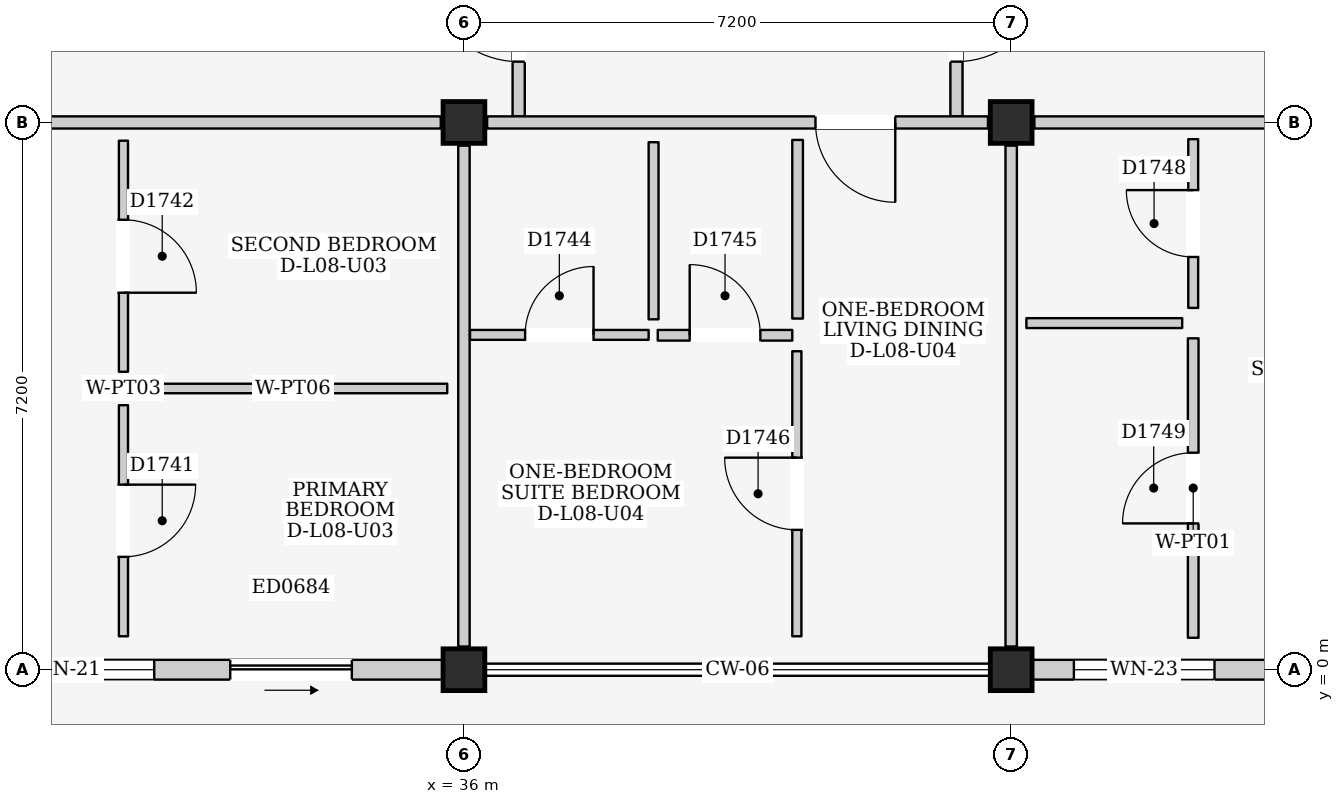
"""IFC4 building model, lengths in metres.
Left out: names, types, materials, properties, quantities, classifications, styles, units other than length and angle.
Written with IfcOpenShell. Run it as: python <this file> out.ifc"""

import sys

from ifc_helpers import new_model, si_unit, direction, frame, frame_2d, origin, origin_2d, place, context, subcontext, project, spatial, rectangle, extrude, element, fill, save


model = new_model("IFC4")
c1 = context("Model", 3, precision=1e-05, world=origin(), true_north=direction((0.0, 1.0)))
c2 = subcontext(c1, "Body", "Model", "MODEL_VIEW")
j1 = project(units=[si_unit("LENGTHUNIT", "METRE"), si_unit("PLANEANGLEUNIT", "RADIAN")], contexts=[c1])
p1 = place(None, origin())
s1 = spatial("IfcSite", under=j1, at=p1, CompositionType="ELEMENT")
p2 = place(p1, origin())
s2 = spatial("IfcBuilding", under=s1, at=p2, CompositionType="ELEMENT")
p3 = place(p2, frame((0.0, 0.0, 28.3)))
s3 = spatial("IfcBuildingStorey", under=s2, at=p3, CompositionType="ELEMENT", Elevation=28.3)
for number, where, z_axis, x_axis in (
    (1, (36.0, 0.0, 0.0), (0.0, 0.0, 1.0), (1.0, 0.0, 0.0)),
    (2, (36.0, 7.2, 0.0), (0.0, 0.0, 1.0), (1.0, 0.0, 0.0)),
    (3, (43.2, 0.0, 0.0), (0.0, 0.0, 1.0), (1.0, 0.0, 0.0)),
    (4, (43.2, 7.2, 0.0), (0.0, 0.0, 1.0), (1.0, 0.0, 0.0)),
):
    element("IfcColumn", number, at=place(p3, frame(where, z_axis=z_axis, x_axis=x_axis)), inside=s3, PredefinedType="COLUMN", context=c2, shape_type="SweptSolid", body=[
        extrude(rectangle(XDim=0.55, YDim=0.55, at=origin_2d()), origin(), (0.0, 0.0, 1.0), 3.2),
    ])
p4 = place(p3, frame((29.075, 0.0, 0.0), z_axis=(0.0, 0.0, 1.0), x_axis=(1.0, 0.0, 0.0)))
e5 = element("IfcWall", 5, at=p4, inside=s3, PredefinedType="ELEMENTEDWALL", context=c2, shape_type="SweptSolid", body=[
    extrude(rectangle(XDim=6.65, YDim=0.26, at=frame_2d((3.325, 0.0))), origin(), (0.0, 0.0, 1.0), 2.495),
])
p5 = place(p4, frame((3.85, 0.0, 0.0)))
e6 = element("IfcOpeningElement", 6, at=p5, cuts=e5, PredefinedType="OPENING", context=c2, shape_type="SweptSolid", body=[
    extrude(rectangle(XDim=1.6, YDim=2.12, at=frame_2d((0.8, 1.06))), frame((0.0, 0.145, 0.0), z_axis=(0.0, -1.0, 0.0), x_axis=(1.0, 0.0, 0.0)), (0.0, 0.0, 1.0), 0.29),
])
p6 = place(p4, frame((0.55, 0.0, 0.78)))
e7 = element("IfcOpeningElement", 7, at=p6, cuts=e5, PredefinedType="OPENING", context=c2, shape_type="SweptSolid", body=[
    extrude(rectangle(XDim=2.3, YDim=1.6, at=frame_2d((1.15, 0.8))), frame((0.0, 0.145, 0.0), z_axis=(0.0, -1.0, 0.0), x_axis=(1.0, 0.0, 0.0)), (0.0, 0.0, 1.0), 0.29),
])
p7 = place(p3, frame((43.475, 0.0, 0.0), z_axis=(0.0, 0.0, 1.0), x_axis=(1.0, 0.0, 0.0)))
e8 = element("IfcWall", 8, at=p7, inside=s3, PredefinedType="ELEMENTEDWALL", context=c2, shape_type="SweptSolid", body=[
    extrude(rectangle(XDim=6.65, YDim=0.26, at=frame_2d((3.325, 0.0))), origin(), (0.0, 0.0, 1.0), 2.495),
])
p8 = place(p7, frame((3.85, 0.0, 0.0)))
e9 = element("IfcOpeningElement", 9, at=p8, cuts=e8, PredefinedType="OPENING", context=c2, shape_type="SweptSolid", body=[
    extrude(rectangle(XDim=2.4, YDim=2.12, at=frame_2d((1.2, 1.06))), frame((0.0, 0.145, 0.0), z_axis=(0.0, -1.0, 0.0), x_axis=(1.0, 0.0, 0.0)), (0.0, 0.0, 1.0), 0.29),
])
p9 = place(p7, frame((0.55, 0.0, 0.9)))
e10 = element("IfcOpeningElement", 10, at=p9, cuts=e8, PredefinedType="OPENING", context=c2, shape_type="SweptSolid", body=[
    extrude(rectangle(XDim=1.85, YDim=1.4, at=frame_2d((0.925, 0.7))), frame((0.0, 0.145, 0.0), z_axis=(0.0, -1.0, 0.0), x_axis=(1.0, 0.0, 0.0)), (0.0, 0.0, 1.0), 0.29),
])
p10 = place(p3, frame((36.72, 7.28, 0.0), z_axis=(0.0, 0.0, 1.0), x_axis=(0.0, 1.0, 0.0)))
e11 = element("IfcWall", 11, at=p10, inside=s3, PredefinedType="PARTITIONING", context=c2, shape_type="SweptSolid", body=[
    extrude(rectangle(XDim=4.32, YDim=0.16, at=frame_2d((2.16, 0.0))), origin(), (0.0, 0.0, 1.0), 2.95),
])
p11 = place(p10, frame((0.72, 0.0, 0.0)))
e12 = element("IfcOpeningElement", 12, at=p11, cuts=e11, PredefinedType="OPENING", context=c2, shape_type="SweptSolid", body=[
    extrude(rectangle(XDim=1.2, YDim=2.2, at=frame_2d((0.6, 1.1))), frame((0.0, 0.095, 0.0), z_axis=(0.0, -1.0, 0.0), x_axis=(1.0, 0.0, 0.0)), (0.0, 0.0, 1.0), 0.19),
])
p12 = place(p3, frame((42.48, 7.28, 0.0), z_axis=(0.0, 0.0, 1.0), x_axis=(0.0, 1.0, 0.0)))
e13 = element("IfcWall", 13, at=p12, inside=s3, PredefinedType="PARTITIONING", context=c2, shape_type="SweptSolid", body=[
    extrude(rectangle(XDim=4.32, YDim=0.16, at=frame_2d((2.16, 0.0))), origin(), (0.0, 0.0, 1.0), 2.95),
])
p13 = place(p12, frame((0.72, 0.0, 0.0)))
e14 = element("IfcOpeningElement", 14, at=p13, cuts=e13, PredefinedType="OPENING", context=c2, shape_type="SweptSolid", body=[
    extrude(rectangle(XDim=1.2, YDim=2.2, at=frame_2d((0.6, 1.1))), frame((0.0, 0.095, 0.0), z_axis=(0.0, -1.0, 0.0), x_axis=(1.0, 0.0, 0.0)), (0.0, 0.0, 1.0), 0.19),
])
p14 = place(p3, frame((29.105, 7.2, 0.0), z_axis=(0.0, 0.0, 1.0), x_axis=(1.0, 0.0, 0.0)))
e15 = element("IfcWall", 15, at=p14, inside=s3, PredefinedType="PARTITIONING", context=c2, shape_type="SweptSolid", body=[
    extrude(rectangle(XDim=6.59, YDim=0.16, at=frame_2d((3.295, 0.0))), origin(), (0.0, 0.0, 1.0), 2.345),
])
p15 = place(p14, frame((0.18, 0.0, 0.0)))
e16 = element("IfcOpeningElement", 16, at=p15, cuts=e15, PredefinedType="OPENING", context=c2, shape_type="SweptSolid", body=[
    extrude(rectangle(XDim=1.05, YDim=2.15, at=frame_2d((0.525, 1.075))), frame((0.0, 0.095, 0.0), z_axis=(0.0, -1.0, 0.0), x_axis=(1.0, 0.0, 0.0)), (0.0, 0.0, 1.0), 0.19),
])
p16 = place(p3, frame((36.0, 0.305, 0.0), z_axis=(0.0, 0.0, 1.0), x_axis=(0.0, 1.0, 0.0)))
e17 = element("IfcWall", 17, at=p16, inside=s3, PredefinedType="PARTITIONING", context=c2, shape_type="SweptSolid", body=[
    extrude(rectangle(XDim=6.59, YDim=0.15, at=frame_2d((3.295, 0.0))), origin(), (0.0, 0.0, 1.0), 2.445),
])
p17 = place(p3, frame((31.52, 0.44, 0.0), z_axis=(0.0, 0.0, 1.0), x_axis=(0.0, 1.0, 0.0)))
e18 = element("IfcWall", 18, at=p17, inside=s3, PredefinedType="PARTITIONING", context=c2, shape_type="SweptSolid", body=[
    extrude(rectangle(XDim=3.04, YDim=0.12, at=frame_2d((1.52, 0.0))), origin(), (0.0, 0.0, 1.0), 2.95),
])
p18 = place(p17, frame((1.045, 0.0, 0.0)))
e19 = element("IfcOpeningElement", 19, at=p18, cuts=e18, PredefinedType="OPENING", context=c2, shape_type="SweptSolid", body=[
    extrude(rectangle(XDim=0.95, YDim=2.15, at=frame_2d((0.475, 1.075))), frame((0.0, 0.075, 0.0), z_axis=(0.0, -1.0, 0.0), x_axis=(1.0, 0.0, 0.0)), (0.0, 0.0, 1.0), 0.15),
])
p19 = place(p3, frame((31.72, 3.7, 0.0), z_axis=(0.0, 0.0, 1.0), x_axis=(1.0, 0.0, 0.0)))
e20 = element("IfcWall", 20, at=p19, inside=s3, PredefinedType="PARTITIONING", context=c2, shape_type="SweptSolid", body=[
    extrude(rectangle(XDim=4.06, YDim=0.125, at=frame_2d((2.03, 0.0))), origin(), (0.0, 0.0, 1.0), 2.95),
])
p20 = place(p3, frame((31.52, 3.92, 0.0), z_axis=(0.0, 0.0, 1.0), x_axis=(0.0, 1.0, 0.0)))
e21 = element("IfcWall", 21, at=p20, inside=s3, PredefinedType="PARTITIONING", context=c2, shape_type="SweptSolid", body=[
    extrude(rectangle(XDim=3.04, YDim=0.12, at=frame_2d((1.52, 0.0))), origin(), (0.0, 0.0, 1.0), 2.95),
])
p21 = place(p20, frame((1.04, 0.0, 0.0)))
e22 = element("IfcOpeningElement", 22, at=p21, cuts=e21, PredefinedType="OPENING", context=c2, shape_type="SweptSolid", body=[
    extrude(rectangle(XDim=0.96, YDim=2.15, at=frame_2d((0.48, 1.075))), frame((0.0, 0.075, 0.0), z_axis=(0.0, -1.0, 0.0), x_axis=(1.0, 0.0, 0.0)), (0.0, 0.0, 1.0), 0.15),
])
p22 = place(p3, frame((36.305, 7.2, 0.0), z_axis=(0.0, 0.0, 1.0), x_axis=(1.0, 0.0, 0.0)))
e23 = element("IfcWall", 23, at=p22, inside=s3, PredefinedType="PARTITIONING", context=c2, shape_type="SweptSolid", body=[
    extrude(rectangle(XDim=6.59, YDim=0.16, at=frame_2d((3.295, 0.0))), origin(), (0.0, 0.0, 1.0), 2.345),
])
p23 = place(p22, frame((4.32, 0.0, 0.0)))
e24 = element("IfcOpeningElement", 24, at=p23, cuts=e23, PredefinedType="OPENING", context=c2, shape_type="SweptSolid", body=[
    extrude(rectangle(XDim=1.05, YDim=2.15, at=frame_2d((0.525, 1.075))), frame((0.0, 0.095, 0.0), z_axis=(0.0, -1.0, 0.0), x_axis=(1.0, 0.0, 0.0)), (0.0, 0.0, 1.0), 0.19),
])
p24 = place(p3, frame((43.2, 0.305, 0.0), z_axis=(0.0, 0.0, 1.0), x_axis=(0.0, 1.0, 0.0)))
e25 = element("IfcWall", 25, at=p24, inside=s3, PredefinedType="PARTITIONING", context=c2, shape_type="SweptSolid", body=[
    extrude(rectangle(XDim=6.59, YDim=0.15, at=frame_2d((3.295, 0.0))), origin(), (0.0, 0.0, 1.0), 2.445),
])
p25 = place(p3, frame((36.08, 4.405, 0.0), z_axis=(0.0, 0.0, 1.0), x_axis=(1.0, 0.0, 0.0)))
e26 = element("IfcWall", 26, at=p25, inside=s3, PredefinedType="PARTITIONING", context=c2, shape_type="SweptSolid", body=[
    extrude(rectangle(XDim=2.35, YDim=0.13, at=frame_2d((1.175, 0.0))), origin(), (0.0, 0.0, 1.0), 2.95),
])
p26 = place(p25, frame((0.725, 0.0, 0.0)))
e27 = element("IfcOpeningElement", 27, at=p26, cuts=e26, PredefinedType="OPENING", context=c2, shape_type="SweptSolid", body=[
    extrude(rectangle(XDim=0.9, YDim=2.1, at=frame_2d((0.45, 1.05))), frame((0.0, 0.08, 0.0), z_axis=(0.0, -1.0, 0.0), x_axis=(1.0, 0.0, 0.0)), (0.0, 0.0, 1.0), 0.16),
])
p27 = place(p3, frame((38.495, 4.61, 0.0), z_axis=(0.0, 0.0, 1.0), x_axis=(0.0, 1.0, 0.0)))
e28 = element("IfcWall", 28, at=p27, inside=s3, PredefinedType="PARTITIONING", context=c2, shape_type="SweptSolid", body=[
    extrude(rectangle(XDim=2.33, YDim=0.13, at=frame_2d((1.165, 0.0))), origin(), (0.0, 0.0, 1.0), 2.95),
])
p28 = place(p3, frame((38.55, 4.4, 0.0), z_axis=(0.0, 0.0, 1.0), x_axis=(1.0, 0.0, 0.0)))
e29 = element("IfcWall", 29, at=p28, inside=s3, PredefinedType="PARTITIONING", context=c2, shape_type="SweptSolid", body=[
    extrude(rectangle(XDim=1.77, YDim=0.14, at=frame_2d((0.885, 0.0))), origin(), (0.0, 0.0, 1.0), 2.95),
])
p29 = place(p28, frame((0.42, 0.0, 0.0)))
e30 = element("IfcOpeningElement", 30, at=p29, cuts=e29, PredefinedType="OPENING", context=c2, shape_type="SweptSolid", body=[
    extrude(rectangle(XDim=0.93, YDim=2.14, at=frame_2d((0.465, 1.07))), frame((0.0, 0.085, 0.0), z_axis=(0.0, -1.0, 0.0), x_axis=(1.0, 0.0, 0.0)), (0.0, 0.0, 1.0), 0.17),
])
p30 = place(p3, frame((40.39, 4.62, 0.0), z_axis=(0.0, 0.0, 1.0), x_axis=(0.0, 1.0, 0.0)))
e31 = element("IfcWall", 31, at=p30, inside=s3, PredefinedType="PARTITIONING", context=c2, shape_type="SweptSolid", body=[
    extrude(rectangle(XDim=2.35, YDim=0.14, at=frame_2d((1.175, 0.0))), origin(), (0.0, 0.0, 1.0), 2.95),
])
p31 = place(p3, frame((40.38, 0.44, 0.0), z_axis=(0.0, 0.0, 1.0), x_axis=(0.0, 1.0, 0.0)))
e32 = element("IfcWall", 32, at=p31, inside=s3, PredefinedType="PARTITIONING", context=c2, shape_type="SweptSolid", body=[
    extrude(rectangle(XDim=3.75, YDim=0.12, at=frame_2d((1.875, 0.0))), origin(), (0.0, 0.0, 1.0), 2.95),
])
p32 = place(p31, frame((1.4, 0.0, 0.0)))
e33 = element("IfcOpeningElement", 33, at=p32, cuts=e32, PredefinedType="OPENING", context=c2, shape_type="SweptSolid", body=[
    extrude(rectangle(XDim=0.95, YDim=2.15, at=frame_2d((0.475, 1.075))), frame((0.0, 0.075, 0.0), z_axis=(0.0, -1.0, 0.0), x_axis=(1.0, 0.0, 0.0)), (0.0, 0.0, 1.0), 0.15),
])
p33 = place(p3, frame((43.505, 7.2, 0.0), z_axis=(0.0, 0.0, 1.0), x_axis=(1.0, 0.0, 0.0)))
e34 = element("IfcWall", 34, at=p33, inside=s3, PredefinedType="PARTITIONING", context=c2, shape_type="SweptSolid", body=[
    extrude(rectangle(XDim=6.59, YDim=0.16, at=frame_2d((3.295, 0.0))), origin(), (0.0, 0.0, 1.0), 2.345),
])
p34 = place(p33, frame((4.12, 0.0, 0.0)))
e35 = element("IfcOpeningElement", 35, at=p34, cuts=e34, PredefinedType="OPENING", context=c2, shape_type="SweptSolid", body=[
    extrude(rectangle(XDim=1.05, YDim=2.15, at=frame_2d((0.525, 1.075))), frame((0.0, 0.095, 0.0), z_axis=(0.0, -1.0, 0.0), x_axis=(1.0, 0.0, 0.0)), (0.0, 0.0, 1.0), 0.19),
])
p35 = place(p3, frame((43.4, 4.56, 0.0), z_axis=(0.0, 0.0, 1.0), x_axis=(1.0, 0.0, 0.0)))
e36 = element("IfcWall", 36, at=p35, inside=s3, PredefinedType="PARTITIONING", context=c2, shape_type="SweptSolid", body=[
    extrude(rectangle(XDim=2.05, YDim=0.13, at=frame_2d((1.025, 0.0))), origin(), (0.0, 0.0, 1.0), 2.95),
])
p36 = place(p3, frame((45.595, 4.76, 0.0), z_axis=(0.0, 0.0, 1.0), x_axis=(0.0, 1.0, 0.0)))
e37 = element("IfcWall", 37, at=p36, inside=s3, PredefinedType="PARTITIONING", context=c2, shape_type="SweptSolid", body=[
    extrude(rectangle(XDim=2.22, YDim=0.13, at=frame_2d((1.11, 0.0))), origin(), (0.0, 0.0, 1.0), 2.95),
])
p37 = place(p36, frame((0.67, 0.0, 0.0)))
e38 = element("IfcOpeningElement", 38, at=p37, cuts=e37, PredefinedType="OPENING", context=c2, shape_type="SweptSolid", body=[
    extrude(rectangle(XDim=0.88, YDim=2.1, at=frame_2d((0.44, 1.05))), frame((0.0, 0.08, 0.0), z_axis=(0.0, -1.0, 0.0), x_axis=(1.0, 0.0, 0.0)), (0.0, 0.0, 1.0), 0.16),
])
p38 = place(p3, frame((45.595, 0.42, 0.0), z_axis=(0.0, 0.0, 1.0), x_axis=(0.0, 1.0, 0.0)))
e39 = element("IfcWall", 39, at=p38, inside=s3, PredefinedType="PARTITIONING", context=c2, shape_type="SweptSolid", body=[
    extrude(rectangle(XDim=3.94, YDim=0.14, at=frame_2d((1.97, 0.0))), origin(), (0.0, 0.0, 1.0), 2.95),
])
p39 = place(p38, frame((1.505, 0.0, 0.0)))
e40 = element("IfcOpeningElement", 40, at=p39, cuts=e39, PredefinedType="OPENING", context=c2, shape_type="SweptSolid", body=[
    extrude(rectangle(XDim=0.93, YDim=2.14, at=frame_2d((0.465, 1.07))), frame((0.0, 0.085, 0.0), z_axis=(0.0, -1.0, 0.0), x_axis=(1.0, 0.0, 0.0)), (0.0, 0.0, 1.0), 0.17),
])
p40 = place(p5, frame((1.6, 0.0, 0.0), z_axis=(0.0, 0.0, 1.0), x_axis=(-1.0, 0.0, 0.0)))
e41 = element("IfcDoor", 41, at=p40, inside=s3, OperationType="SLIDING_TO_RIGHT", PredefinedType="DOOR", context=c2, shape_type="SweptSolid", body=[
    extrude(rectangle(XDim=1.6, YDim=2.12, at=frame_2d((0.8, 1.06))), frame((0.0, 0.025, 0.0), z_axis=(0.0, -1.0, 0.0), x_axis=(1.0, 0.0, 0.0)), (0.0, 0.0, 1.0), 0.05),
])
fill(e6, e41)
p41 = place(p6, origin())
e42 = element("IfcWindow", 42, at=p41, inside=s3, PartitioningType="TRIPLE_PANEL_VERTICAL", PredefinedType="WINDOW", context=c2, shape_type="SweptSolid", body=[
    extrude(rectangle(XDim=2.3, YDim=1.6, at=frame_2d((1.15, 0.8))), frame((0.0, 0.03, 0.0), z_axis=(0.0, -1.0, 0.0), x_axis=(1.0, 0.0, 0.0)), (0.0, 0.0, 1.0), 0.06),
])
fill(e7, e42)
p42 = place(p9, origin())
e43 = element("IfcWindow", 43, at=p42, inside=s3, PartitioningType="DOUBLE_PANEL_VERTICAL", PredefinedType="WINDOW", context=c2, shape_type="SweptSolid", body=[
    extrude(rectangle(XDim=1.85, YDim=1.4, at=frame_2d((0.925, 0.7))), frame((0.0, 0.03, 0.0), z_axis=(0.0, -1.0, 0.0), x_axis=(1.0, 0.0, 0.0)), (0.0, 0.0, 1.0), 0.06),
])
fill(e10, e43)
p43 = place(p11, origin())
e44 = element("IfcDoor", 44, at=p43, inside=s3, OperationType="SINGLE_SWING_RIGHT", PredefinedType="DOOR", context=c2, shape_type="SweptSolid", body=[
    extrude(rectangle(XDim=1.2, YDim=2.2, at=frame_2d((0.6, 1.1))), frame((0.0, 0.025, 0.0), z_axis=(0.0, -1.0, 0.0), x_axis=(1.0, 0.0, 0.0)), (0.0, 0.0, 1.0), 0.05),
])
fill(e12, e44)
p44 = place(p13, frame((1.2, 0.0, 0.0), z_axis=(0.0, 0.0, 1.0), x_axis=(-1.0, 0.0, 0.0)))
e45 = element("IfcDoor", 45, at=p44, inside=s3, OperationType="SINGLE_SWING_LEFT", PredefinedType="DOOR", context=c2, shape_type="SweptSolid", body=[
    extrude(rectangle(XDim=1.2, YDim=2.2, at=frame_2d((0.6, 1.1))), frame((0.0, 0.025, 0.0), z_axis=(0.0, -1.0, 0.0), x_axis=(1.0, 0.0, 0.0)), (0.0, 0.0, 1.0), 0.05),
])
fill(e14, e45)
p45 = place(p18, frame((0.95, 0.0, 0.0), z_axis=(0.0, 0.0, 1.0), x_axis=(-1.0, 0.0, 0.0)))
e46 = element("IfcDoor", 46, at=p45, inside=s3, OperationType="SINGLE_SWING_LEFT", PredefinedType="DOOR", context=c2, shape_type="SweptSolid", body=[
    extrude(rectangle(XDim=0.95, YDim=2.15, at=frame_2d((0.475, 1.075))), frame((0.0, 0.025, 0.0), z_axis=(0.0, -1.0, 0.0), x_axis=(1.0, 0.0, 0.0)), (0.0, 0.0, 1.0), 0.05),
])
fill(e19, e46)
p46 = place(p21, frame((0.96, 0.0, 0.0), z_axis=(0.0, 0.0, 1.0), x_axis=(-1.0, 0.0, 0.0)))
e47 = element("IfcDoor", 47, at=p46, inside=s3, OperationType="SINGLE_SWING_RIGHT", PredefinedType="DOOR", context=c2, shape_type="SweptSolid", body=[
    extrude(rectangle(XDim=0.96, YDim=2.15, at=frame_2d((0.48, 1.075))), frame((0.0, 0.025, 0.0), z_axis=(0.0, -1.0, 0.0), x_axis=(1.0, 0.0, 0.0)), (0.0, 0.0, 1.0), 0.05),
])
fill(e22, e47)
p47 = place(p23, frame((1.05, 0.0, 0.0), z_axis=(0.0, 0.0, 1.0), x_axis=(-1.0, 0.0, 0.0)))
e48 = element("IfcDoor", 48, at=p47, inside=s3, OperationType="SINGLE_SWING_LEFT", PredefinedType="DOOR", context=c2, shape_type="SweptSolid", body=[
    extrude(rectangle(XDim=1.05, YDim=2.15, at=frame_2d((0.525, 1.075))), frame((0.0, 0.025, 0.0), z_axis=(0.0, -1.0, 0.0), x_axis=(1.0, 0.0, 0.0)), (0.0, 0.0, 1.0), 0.05),
])
fill(e24, e48)
p48 = place(p26, origin())
e49 = element("IfcDoor", 49, at=p48, inside=s3, OperationType="SINGLE_SWING_RIGHT", PredefinedType="DOOR", context=c2, shape_type="SweptSolid", body=[
    extrude(rectangle(XDim=0.9, YDim=2.1, at=frame_2d((0.45, 1.05))), frame((0.0, 0.025, 0.0), z_axis=(0.0, -1.0, 0.0), x_axis=(1.0, 0.0, 0.0)), (0.0, 0.0, 1.0), 0.05),
])
fill(e27, e49)
p49 = place(p29, origin())
e50 = element("IfcDoor", 50, at=p49, inside=s3, OperationType="SINGLE_SWING_LEFT", PredefinedType="DOOR", context=c2, shape_type="SweptSolid", body=[
    extrude(rectangle(XDim=0.93, YDim=2.14, at=frame_2d((0.465, 1.07))), frame((0.0, 0.025, 0.0), z_axis=(0.0, -1.0, 0.0), x_axis=(1.0, 0.0, 0.0)), (0.0, 0.0, 1.0), 0.05),
])
fill(e30, e50)
p50 = place(p32, origin())
e51 = element("IfcDoor", 51, at=p50, inside=s3, OperationType="SINGLE_SWING_RIGHT", PredefinedType="DOOR", context=c2, shape_type="SweptSolid", body=[
    extrude(rectangle(XDim=0.95, YDim=2.15, at=frame_2d((0.475, 1.075))), frame((0.0, 0.025, 0.0), z_axis=(0.0, -1.0, 0.0), x_axis=(1.0, 0.0, 0.0)), (0.0, 0.0, 1.0), 0.05),
])
fill(e33, e51)
p51 = place(p37, origin())
e52 = element("IfcDoor", 52, at=p51, inside=s3, OperationType="SINGLE_SWING_RIGHT", PredefinedType="DOOR", context=c2, shape_type="SweptSolid", body=[
    extrude(rectangle(XDim=0.88, YDim=2.1, at=frame_2d((0.44, 1.05))), frame((0.0, 0.025, 0.0), z_axis=(0.0, -1.0, 0.0), x_axis=(1.0, 0.0, 0.0)), (0.0, 0.0, 1.0), 0.05),
])
fill(e38, e52)
p52 = place(p39, origin())
e53 = element("IfcDoor", 53, at=p52, inside=s3, OperationType="SINGLE_SWING_LEFT", PredefinedType="DOOR", context=c2, shape_type="SweptSolid", body=[
    extrude(rectangle(XDim=0.93, YDim=2.14, at=frame_2d((0.465, 1.07))), frame((0.0, 0.025, 0.0), z_axis=(0.0, -1.0, 0.0), x_axis=(1.0, 0.0, 0.0)), (0.0, 0.0, 1.0), 0.05),
])
fill(e40, e53)
save(model, sys.argv[1])
